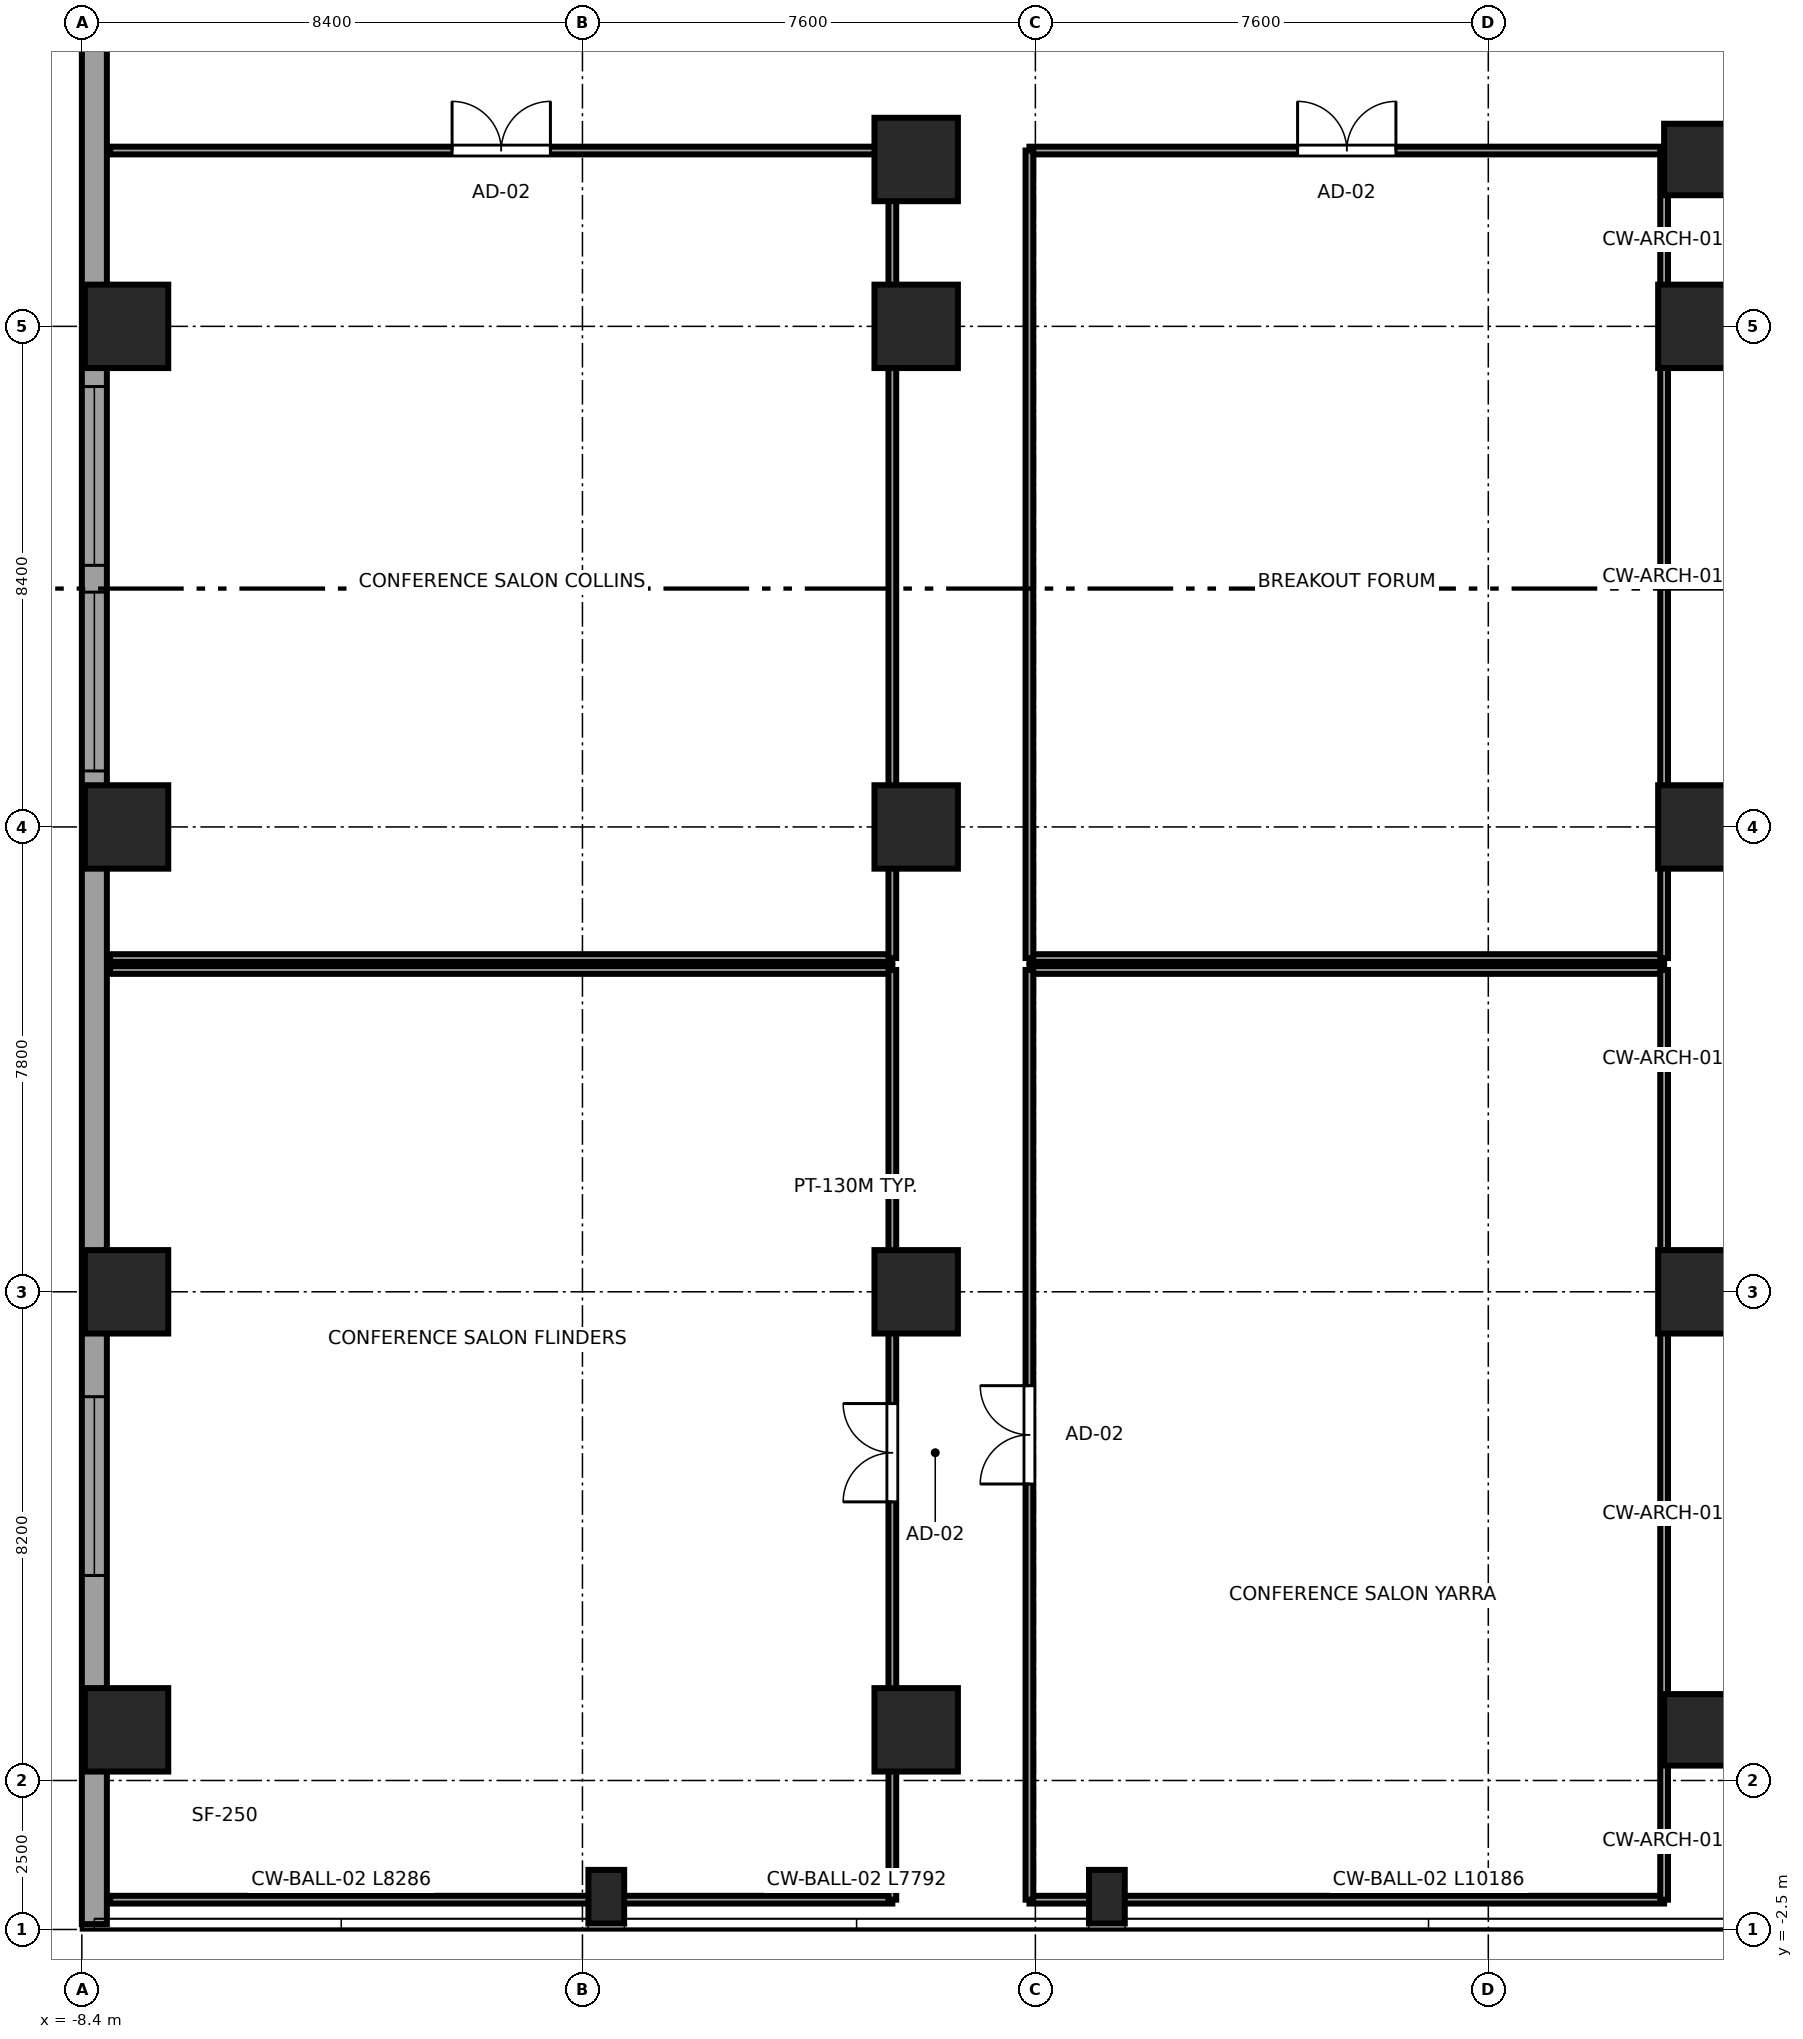
"""IFC4 building model, lengths in metres.
Left out: names, types, materials, properties, quantities, classifications, styles, units other than length and angle.
Written with IfcOpenShell. Run it as: python <this file> out.ifc"""

import sys

from ifc_helpers import new_model, si_unit, direction, frame, frame_2d, origin, origin_2d, place, context, subcontext, project, spatial, rectangle, circle, extrude, source, transform, mapped, element, fill, save


model = new_model("IFC4")
c1 = context("Model", 3, precision=1e-05, world=origin(), true_north=direction((0.0, 1.0)))
c2 = subcontext(c1, "Body", "Model", "MODEL_VIEW")
j1 = project(units=[si_unit("LENGTHUNIT", "METRE"), si_unit("PLANEANGLEUNIT", "RADIAN")], contexts=[c1])
p1 = place(None, origin())
s1 = spatial("IfcSite", under=j1, at=p1, CompositionType="ELEMENT")
p2 = place(p1, origin())
s2 = spatial("IfcBuilding", under=s1, at=p2, CompositionType="ELEMENT")
p3 = place(p2, frame((0.0, 0.0, 11.0)))
s3 = spatial("IfcBuildingStorey", under=s2, at=p3, CompositionType="ELEMENT", Elevation=11.0)
m1 = source(origin(), c2, "Body", "SweptSolid", [
    extrude(rectangle(XDim=1.4, YDim=1.4, at=origin_2d()), origin(), (0.0, 0.0, 1.0), 5.0),
])
for number, where, z_axis, x_axis in (
    (1, (-7.65, 0.85, 0.0), (0.0, 0.0, 1.0), (1.0, 0.0, 0.0)),
    (2, (-7.65, 8.2, 0.0), (0.0, 0.0, 1.0), (1.0, 0.0, 0.0)),
    (3, (-7.65, 16.0, 0.0), (0.0, 0.0, 1.0), (1.0, 0.0, 0.0)),
    (4, (-7.65, 24.4, 0.0), (0.0, 0.0, 1.0), (1.0, 0.0, 0.0)),
):
    element("IfcColumn", number, at=place(p3, frame(where, z_axis=z_axis, x_axis=x_axis)), inside=s3, PredefinedType="COLUMN", context=c2, shape_type="MappedRepresentation", body=[
        mapped(m1, transform((0.0, 0.0, 0.0), x_axis=(1.0, 0.0, 0.0), y_axis=(0.0, 1.0, 0.0), z_axis=(0.0, 0.0, 1.0), scale=1.0)),
    ])
m2 = source(origin(), c2, "Body", "SweptSolid", [
    extrude(circle(Radius=0.6, at=origin_2d()), origin(), (0.0, 0.0, 1.0), 5.0),
])
p4 = place(p3, frame((18.75, 0.85, 0.0), z_axis=(0.0, 0.0, 1.0), x_axis=(1.0, 0.0, 0.0)))
e5 = element("IfcColumn", 5, at=p4, inside=s3, PredefinedType="COLUMN", context=c2, shape_type="MappedRepresentation", body=[
    mapped(m2, transform((0.0, 0.0, 0.0), x_axis=(1.0, 0.0, 0.0), y_axis=(0.0, 1.0, 0.0), z_axis=(0.0, 0.0, 1.0), scale=1.0)),
])
for number, where, z_axis, x_axis in (
    (6, (18.75, 8.2, 0.0), (0.0, 0.0, 1.0), (1.0, 0.0, 0.0)),
    (7, (18.75, 16.0, 0.0), (0.0, 0.0, 1.0), (1.0, 0.0, 0.0)),
    (8, (18.75, 24.4, 0.0), (0.0, 0.0, 1.0), (1.0, 0.0, 0.0)),
):
    element("IfcColumn", number, at=place(p3, frame(where, z_axis=z_axis, x_axis=x_axis)), inside=s3, PredefinedType="COLUMN", context=c2, shape_type="MappedRepresentation", body=[
        mapped(m1, transform((0.0, 0.0, 0.0), x_axis=(1.0, 0.0, 0.0), y_axis=(0.0, 1.0, 0.0), z_axis=(0.0, 0.0, 1.0), scale=1.0)),
    ])
p5 = place(p3, frame((18.75, 27.2, 0.0), z_axis=(0.0, 0.0, 1.0), x_axis=(1.0, 0.0, 0.0)))
e9 = element("IfcColumn", 9, at=p5, inside=s3, PredefinedType="COLUMN", context=c2, shape_type="MappedRepresentation", body=[
    mapped(m2, transform((0.0, 0.0, 0.0), x_axis=(1.0, 0.0, 0.0), y_axis=(0.0, 1.0, 0.0), z_axis=(0.0, 0.0, 1.0), scale=1.0)),
])
for number, where, z_axis, x_axis in (
    (10, (5.6, 0.85, 0.0), (0.0, 0.0, 1.0), (1.0, 0.0, 0.0)),
    (11, (5.6, 8.2, 0.0), (0.0, 0.0, 1.0), (1.0, 0.0, 0.0)),
    (12, (5.6, 16.0, 0.0), (0.0, 0.0, 1.0), (1.0, 0.0, 0.0)),
    (13, (5.6, 24.4, 0.0), (0.0, 0.0, 1.0), (1.0, 0.0, 0.0)),
    (14, (5.6, 27.2, 0.0), (0.0, 0.0, 1.0), (1.0, 0.0, 0.0)),
):
    element("IfcColumn", number, at=place(p3, frame(where, z_axis=z_axis, x_axis=x_axis)), inside=s3, PredefinedType="COLUMN", context=c2, shape_type="MappedRepresentation", body=[
        mapped(m1, transform((0.0, 0.0, 0.0), x_axis=(1.0, 0.0, 0.0), y_axis=(0.0, 1.0, 0.0), z_axis=(0.0, 0.0, 1.0), scale=1.0)),
    ])
m3 = source(origin(), c2, "Body", "SweptSolid", [
    extrude(rectangle(XDim=0.6, YDim=0.9, at=origin_2d()), origin(), (0.0, 0.0, 1.0), 5.0),
])
for number, where, z_axis, x_axis in (
    (15, (0.4, -1.95, 0.0), (0.0, 0.0, 1.0), (1.0, 0.0, 0.0)),
    (16, (8.8, -1.95, 0.0), (0.0, 0.0, 1.0), (1.0, 0.0, 0.0)),
):
    element("IfcColumn", number, at=place(p3, frame(where, z_axis=z_axis, x_axis=x_axis)), inside=s3, PredefinedType="PILASTER", context=c2, shape_type="MappedRepresentation", body=[
        mapped(m3, transform((0.0, 0.0, 0.0), x_axis=(1.0, 0.0, 0.0), y_axis=(0.0, 1.0, 0.0), z_axis=(0.0, 0.0, 1.0), scale=1.0)),
    ])
p6 = place(p3, frame((-8.19, 48.29, 0.0), z_axis=(0.0, 0.0, 1.0), x_axis=(0.0, -1.0, 0.0)))
e17 = element("IfcWall", 17, at=p6, inside=s3, PredefinedType="SOLIDWALL", context=c2, shape_type="SweptSolid", body=[
    extrude(rectangle(XDim=50.7, YDim=0.42, at=frame_2d((25.35, 0.0))), origin(), (0.0, 0.0, 1.0), 4.74),
])
p7 = place(p6, frame((5.85, 0.0, 0.65)))
e18 = element("IfcOpeningElement", 18, at=p7, cuts=e17, PredefinedType="OPENING", context=c2, shape_type="SweptSolid", body=[
    extrude(rectangle(XDim=3.0, YDim=2.5, at=frame_2d((1.5, 1.25))), frame((0.0, 0.22, 0.0), z_axis=(0.0, -1.0, 0.0), x_axis=(1.0, 0.0, 0.0)), (0.0, 0.0, 1.0), 0.44),
])
p8 = place(p6, frame((10.35, 0.0, 0.65)))
e19 = element("IfcOpeningElement", 19, at=p8, cuts=e17, PredefinedType="OPENING", context=c2, shape_type="SweptSolid", body=[
    extrude(rectangle(XDim=3.0, YDim=2.5, at=frame_2d((1.5, 1.25))), frame((0.0, 0.22, 0.0), z_axis=(0.0, -1.0, 0.0), x_axis=(1.0, 0.0, 0.0)), (0.0, 0.0, 1.0), 0.44),
])
p9 = place(p6, frame((24.9, 0.0, 0.65)))
e20 = element("IfcOpeningElement", 20, at=p9, cuts=e17, PredefinedType="OPENING", context=c2, shape_type="SweptSolid", body=[
    extrude(rectangle(XDim=3.0, YDim=2.5, at=frame_2d((1.5, 1.25))), frame((0.0, 0.22, 0.0), z_axis=(0.0, -1.0, 0.0), x_axis=(1.0, 0.0, 0.0)), (0.0, 0.0, 1.0), 0.44),
])
p10 = place(p6, frame((28.35, 0.0, 0.65)))
e21 = element("IfcOpeningElement", 21, at=p10, cuts=e17, PredefinedType="OPENING", context=c2, shape_type="SweptSolid", body=[
    extrude(rectangle(XDim=3.0, YDim=2.5, at=frame_2d((1.5, 1.25))), frame((0.0, 0.22, 0.0), z_axis=(0.0, -1.0, 0.0), x_axis=(1.0, 0.0, 0.0)), (0.0, 0.0, 1.0), 0.44),
])
p11 = place(p6, frame((41.85, 0.0, 0.65)))
e22 = element("IfcOpeningElement", 22, at=p11, cuts=e17, PredefinedType="OPENING", context=c2, shape_type="SweptSolid", body=[
    extrude(rectangle(XDim=3.0, YDim=2.5, at=frame_2d((1.5, 1.25))), frame((0.0, 0.22, 0.0), z_axis=(0.0, -1.0, 0.0), x_axis=(1.0, 0.0, 0.0)), (0.0, 0.0, 1.0), 0.44),
])
p12 = place(p3, frame((-7.925, -2.0, 0.0), z_axis=(0.0, 0.0, 1.0), x_axis=(1.0, 0.0, 0.0)))
e23 = element("IfcWall", 23, at=p12, inside=s3, PredefinedType="MOVABLE", context=c2, shape_type="SweptSolid", body=[
    extrude(rectangle(XDim=13.125, YDim=0.13, at=frame_2d((6.562, 0.0))), origin(), (0.0, 0.0, 1.0), 4.03),
])
p13 = place(p3, frame((-7.925, 13.6, 0.0), z_axis=(0.0, 0.0, 1.0), x_axis=(1.0, 0.0, 0.0)))
e24 = element("IfcWall", 24, at=p13, inside=s3, PredefinedType="MOVABLE", context=c2, shape_type="SweptSolid", body=[
    extrude(rectangle(XDim=13.125, YDim=0.13, at=frame_2d((6.562, 0.0))), origin(), (0.0, 0.0, 1.0), 4.74),
])
p14 = place(p3, frame((5.2, -2.0, 0.0), z_axis=(0.0, 0.0, 1.0), x_axis=(0.0, 1.0, 0.0)))
e25 = element("IfcWall", 25, at=p14, inside=s3, PredefinedType="MOVABLE", context=c2, shape_type="SweptSolid", body=[
    extrude(rectangle(XDim=15.6, YDim=0.13, at=frame_2d((7.8, 0.0))), origin(), (0.0, 0.0, 1.0), 4.74),
])
p15 = place(p14, frame((6.675, 0.0, 0.0)))
e26 = element("IfcOpeningElement", 26, at=p15, cuts=e25, PredefinedType="OPENING", context=c2, shape_type="SweptSolid", body=[
    extrude(rectangle(XDim=1.65, YDim=2.15, at=frame_2d((0.825, 1.075))), frame((0.0, 0.075, 0.0), z_axis=(0.0, -1.0, 0.0), x_axis=(1.0, 0.0, 0.0)), (0.0, 0.0, 1.0), 0.15),
])
p16 = place(p3, frame((7.5, -2.0, 0.0), z_axis=(0.0, 0.0, 1.0), x_axis=(1.0, 0.0, 0.0)))
e27 = element("IfcWall", 27, at=p16, inside=s3, PredefinedType="MOVABLE", context=c2, shape_type="SweptSolid", body=[
    extrude(rectangle(XDim=10.65, YDim=0.13, at=frame_2d((5.325, 0.0))), origin(), (0.0, 0.0, 1.0), 4.03),
])
p17 = place(p3, frame((7.5, 13.6, 0.0), z_axis=(0.0, 0.0, 1.0), x_axis=(1.0, 0.0, 0.0)))
e28 = element("IfcWall", 28, at=p17, inside=s3, PredefinedType="MOVABLE", context=c2, shape_type="SweptSolid", body=[
    extrude(rectangle(XDim=10.65, YDim=0.13, at=frame_2d((5.325, 0.0))), origin(), (0.0, 0.0, 1.0), 4.74),
])
p18 = place(p3, frame((7.5, -2.0, 0.0), z_axis=(0.0, 0.0, 1.0), x_axis=(0.0, 1.0, 0.0)))
e29 = element("IfcWall", 29, at=p18, inside=s3, PredefinedType="MOVABLE", context=c2, shape_type="SweptSolid", body=[
    extrude(rectangle(XDim=15.6, YDim=0.13, at=frame_2d((7.8, 0.0))), origin(), (0.0, 0.0, 1.0), 4.74),
])
p19 = place(p18, frame((6.975, 0.0, 0.0)))
e30 = element("IfcOpeningElement", 30, at=p19, cuts=e29, PredefinedType="OPENING", context=c2, shape_type="SweptSolid", body=[
    extrude(rectangle(XDim=1.65, YDim=2.15, at=frame_2d((0.825, 1.075))), frame((0.0, 0.075, 0.0), z_axis=(0.0, -1.0, 0.0), x_axis=(1.0, 0.0, 0.0)), (0.0, 0.0, 1.0), 0.15),
])
p20 = place(p3, frame((18.15, -2.0, 0.0), z_axis=(0.0, 0.0, 1.0), x_axis=(0.0, 1.0, 0.0)))
e31 = element("IfcWall", 31, at=p20, inside=s3, PredefinedType="MOVABLE", context=c2, shape_type="SweptSolid", body=[
    extrude(rectangle(XDim=15.6, YDim=0.13, at=frame_2d((7.8, 0.0))), origin(), (0.0, 0.0, 1.0), 4.74),
])
p21 = place(p3, frame((-7.925, 13.8, 0.0), z_axis=(0.0, 0.0, 1.0), x_axis=(1.0, 0.0, 0.0)))
e32 = element("IfcWall", 32, at=p21, inside=s3, PredefinedType="MOVABLE", context=c2, shape_type="SweptSolid", body=[
    extrude(rectangle(XDim=13.125, YDim=0.13, at=frame_2d((6.562, 0.0))), origin(), (0.0, 0.0, 1.0), 4.74),
])
p22 = place(p3, frame((-7.925, 27.35, 0.0), z_axis=(0.0, 0.0, 1.0), x_axis=(1.0, 0.0, 0.0)))
e33 = element("IfcWall", 33, at=p22, inside=s3, PredefinedType="MOVABLE", context=c2, shape_type="SweptSolid", body=[
    extrude(rectangle(XDim=13.125, YDim=0.13, at=frame_2d((6.562, 0.0))), origin(), (0.0, 0.0, 1.0), 3.53),
])
p23 = place(p22, frame((5.738, 0.0, 0.0)))
e34 = element("IfcOpeningElement", 34, at=p23, cuts=e33, PredefinedType="OPENING", context=c2, shape_type="SweptSolid", body=[
    extrude(rectangle(XDim=1.65, YDim=2.15, at=frame_2d((0.825, 1.075))), frame((0.0, 0.075, 0.0), z_axis=(0.0, -1.0, 0.0), x_axis=(1.0, 0.0, 0.0)), (0.0, 0.0, 1.0), 0.15),
])
p24 = place(p3, frame((5.2, 13.8, 0.0), z_axis=(0.0, 0.0, 1.0), x_axis=(0.0, 1.0, 0.0)))
e35 = element("IfcWall", 35, at=p24, inside=s3, PredefinedType="MOVABLE", context=c2, shape_type="SweptSolid", body=[
    extrude(rectangle(XDim=13.55, YDim=0.13, at=frame_2d((6.775, 0.0))), origin(), (0.0, 0.0, 1.0), 4.74),
])
p25 = place(p3, frame((7.5, 13.8, 0.0), z_axis=(0.0, 0.0, 1.0), x_axis=(1.0, 0.0, 0.0)))
e36 = element("IfcWall", 36, at=p25, inside=s3, PredefinedType="MOVABLE", context=c2, shape_type="SweptSolid", body=[
    extrude(rectangle(XDim=10.65, YDim=0.13, at=frame_2d((5.325, 0.0))), origin(), (0.0, 0.0, 1.0), 4.74),
])
p26 = place(p3, frame((7.5, 27.35, 0.0), z_axis=(0.0, 0.0, 1.0), x_axis=(1.0, 0.0, 0.0)))
e37 = element("IfcWall", 37, at=p26, inside=s3, PredefinedType="MOVABLE", context=c2, shape_type="SweptSolid", body=[
    extrude(rectangle(XDim=10.65, YDim=0.13, at=frame_2d((5.325, 0.0))), origin(), (0.0, 0.0, 1.0), 3.53),
])
p27 = place(p26, frame((4.5, 0.0, 0.0)))
e38 = element("IfcOpeningElement", 38, at=p27, cuts=e37, PredefinedType="OPENING", context=c2, shape_type="SweptSolid", body=[
    extrude(rectangle(XDim=1.65, YDim=2.15, at=frame_2d((0.825, 1.075))), frame((0.0, 0.075, 0.0), z_axis=(0.0, -1.0, 0.0), x_axis=(1.0, 0.0, 0.0)), (0.0, 0.0, 1.0), 0.15),
])
for number, where, z_axis, x_axis in (
    (39, (7.5, 13.8, 0.0), (0.0, 0.0, 1.0), (0.0, 1.0, 0.0)),
    (40, (18.15, 13.8, 0.0), (0.0, 0.0, 1.0), (0.0, 1.0, 0.0)),
):
    element("IfcWall", number, at=place(p3, frame(where, z_axis=z_axis, x_axis=x_axis)), inside=s3, PredefinedType="MOVABLE", context=c2, shape_type="SweptSolid", body=[
        extrude(rectangle(XDim=13.55, YDim=0.13, at=frame_2d((6.775, 0.0))), origin(), (0.0, 0.0, 1.0), 4.74),
    ])
m4 = source(origin(), c2, "Body", "SweptSolid", [
    extrude(rectangle(XDim=3.0, YDim=2.5, at=frame_2d((1.5, 1.25))), frame((0.0, 0.09, 0.0), z_axis=(0.0, -1.0, 0.0), x_axis=(1.0, 0.0, 0.0)), (0.0, 0.0, 1.0), 0.06),
])
p28 = place(p9, origin())
e41 = element("IfcWindow", 41, at=p28, inside=s3, PartitioningType="TRIPLE_PANEL_HORIZONTAL", PredefinedType="WINDOW", context=c2, shape_type="MappedRepresentation", body=[
    mapped(m4, transform((0.0, 0.0, 0.0), x_axis=(1.0, 0.0, 0.0), y_axis=(0.0, 1.0, 0.0), z_axis=(0.0, 0.0, 1.0), scale=1.0)),
])
fill(e20, e41)
p29 = place(p10, origin())
e42 = element("IfcWindow", 42, at=p29, inside=s3, PartitioningType="TRIPLE_PANEL_HORIZONTAL", PredefinedType="WINDOW", context=c2, shape_type="MappedRepresentation", body=[
    mapped(m4, transform((0.0, 0.0, 0.0), x_axis=(1.0, 0.0, 0.0), y_axis=(0.0, 1.0, 0.0), z_axis=(0.0, 0.0, 1.0), scale=1.0)),
])
fill(e21, e42)
p30 = place(p11, origin())
e43 = element("IfcWindow", 43, at=p30, inside=s3, PartitioningType="TRIPLE_PANEL_HORIZONTAL", PredefinedType="WINDOW", context=c2, shape_type="MappedRepresentation", body=[
    mapped(m4, transform((0.0, 0.0, 0.0), x_axis=(1.0, 0.0, 0.0), y_axis=(0.0, 1.0, 0.0), z_axis=(0.0, 0.0, 1.0), scale=1.0)),
])
fill(e22, e43)
m5 = source(origin(), c2, "Body", "SweptSolid", [
    extrude(rectangle(XDim=1.65, YDim=2.15, at=frame_2d((0.825, 1.075))), frame((0.0, 0.025, 0.0), z_axis=(0.0, -1.0, 0.0), x_axis=(1.0, 0.0, 0.0)), (0.0, 0.0, 1.0), 0.05),
])
p31 = place(p15, origin())
e44 = element("IfcDoor", 44, at=p31, inside=s3, OperationType="DOUBLE_DOOR_SINGLE_SWING", PredefinedType="DOOR", context=c2, shape_type="MappedRepresentation", body=[
    mapped(m5, transform((0.0, 0.0, 0.0), x_axis=(1.0, 0.0, 0.0), y_axis=(0.0, 1.0, 0.0), z_axis=(0.0, 0.0, 1.0), scale=1.0)),
])
fill(e26, e44)
p32 = place(p19, origin())
e45 = element("IfcDoor", 45, at=p32, inside=s3, OperationType="DOUBLE_DOOR_SINGLE_SWING", PredefinedType="DOOR", context=c2, shape_type="MappedRepresentation", body=[
    mapped(m5, transform((0.0, 0.0, 0.0), x_axis=(1.0, 0.0, 0.0), y_axis=(0.0, 1.0, 0.0), z_axis=(0.0, 0.0, 1.0), scale=1.0)),
])
fill(e30, e45)
p33 = place(p23, origin())
e46 = element("IfcDoor", 46, at=p33, inside=s3, OperationType="DOUBLE_DOOR_SINGLE_SWING", PredefinedType="DOOR", context=c2, shape_type="MappedRepresentation", body=[
    mapped(m5, transform((0.0, 0.0, 0.0), x_axis=(1.0, 0.0, 0.0), y_axis=(0.0, 1.0, 0.0), z_axis=(0.0, 0.0, 1.0), scale=1.0)),
])
fill(e34, e46)
p34 = place(p27, origin())
e47 = element("IfcDoor", 47, at=p34, inside=s3, OperationType="DOUBLE_DOOR_SINGLE_SWING", PredefinedType="DOOR", context=c2, shape_type="MappedRepresentation", body=[
    mapped(m5, transform((0.0, 0.0, 0.0), x_axis=(1.0, 0.0, 0.0), y_axis=(0.0, 1.0, 0.0), z_axis=(0.0, 0.0, 1.0), scale=1.0)),
])
fill(e38, e47)
save(model, sys.argv[1])
